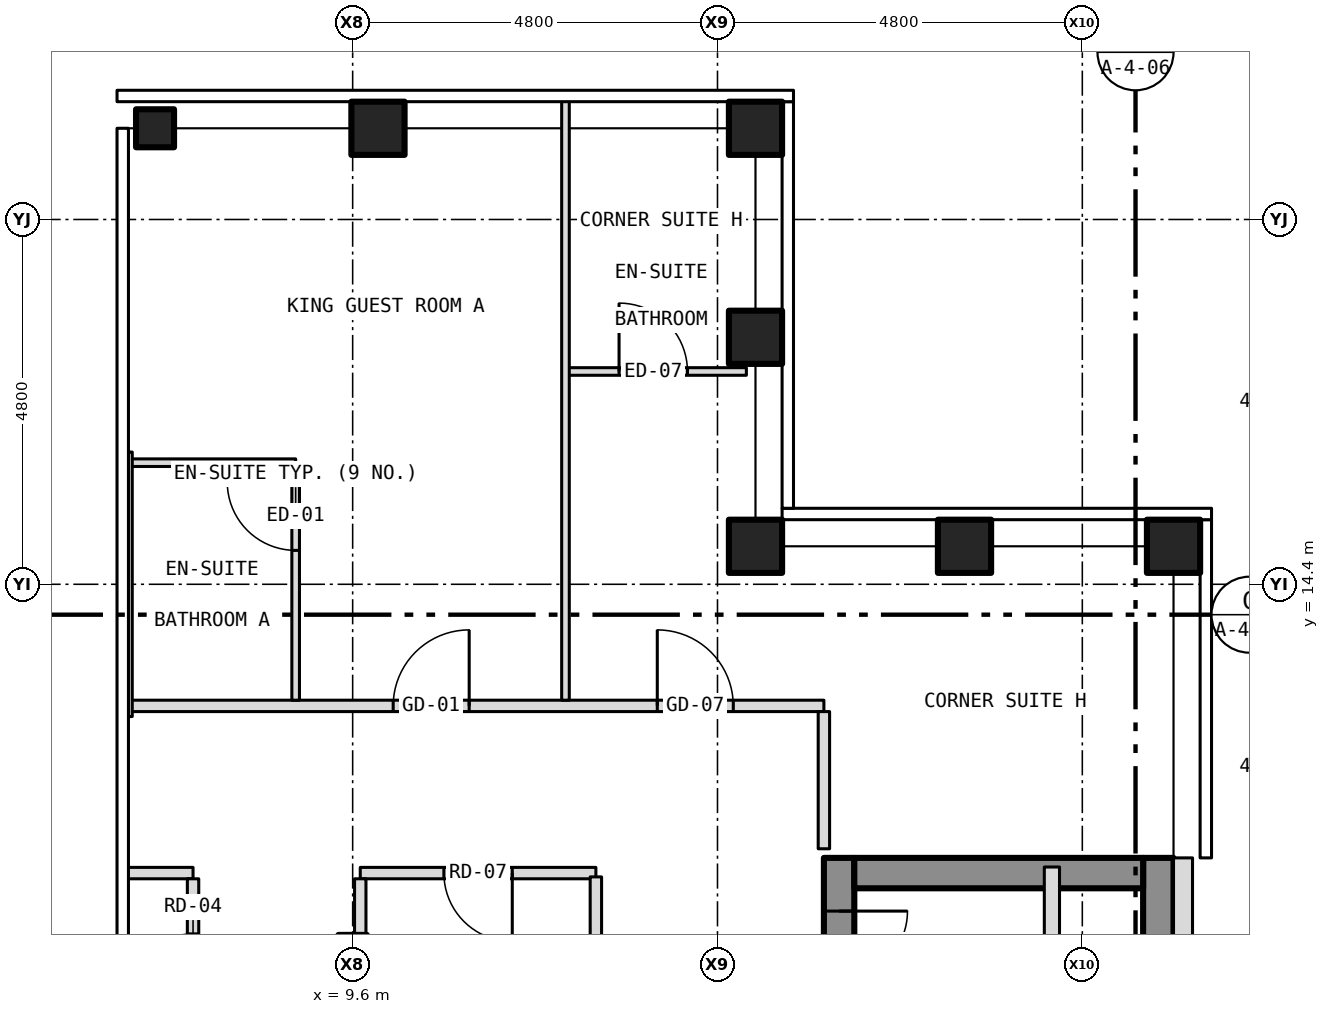
"""IFC4 building model, lengths in metres.
Left out: names, types, materials, properties, quantities, classifications, styles, units other than length and angle.
Written with IfcOpenShell. Run it as: python <this file> out.ifc"""

import sys

from ifc_helpers import new_model, si_unit, direction, frame, frame_2d, origin, origin_2d, place, context, subcontext, project, spatial, rectangle, hollow_rectangle, extrude, element, fill, save


model = new_model("IFC4")
c1 = context("Model", 3, precision=1e-05, world=origin(), true_north=direction((0.0, 1.0)))
c2 = subcontext(c1, "Body", "Model", "MODEL_VIEW")
j1 = project(units=[si_unit("LENGTHUNIT", "METRE"), si_unit("PLANEANGLEUNIT", "RADIAN")], contexts=[c1])
p1 = place(None, origin())
s1 = spatial("IfcSite", under=j1, at=p1, CompositionType="ELEMENT")
p2 = place(p1, origin())
s2 = spatial("IfcBuilding", under=s1, at=p2, CompositionType="ELEMENT")
p3 = place(p2, frame((0.0, 0.0, 233.0)))
s3 = spatial("IfcBuildingStorey", under=s2, at=p3, CompositionType="ELEMENT", Elevation=233.0)
for number, where, z_axis, x_axis in (
    (1, (9.933, 20.4, -0.15), (0.0, 0.0, 1.0), (1.0, 0.0, 0.0)),
    (2, (14.9, 20.4, -0.15), (0.0, 0.0, 1.0), (1.0, 0.0, 0.0)),
    (3, (20.4, 14.9, -0.15), (0.0, 0.0, 1.0), (1.0, 0.0, 0.0)),
    (4, (14.9, 14.9, -0.15), (0.0, 0.0, 1.0), (1.0, 0.0, 0.0)),
    (5, (14.9, 17.65, -0.15), (0.0, 0.0, 1.0), (1.0, 0.0, 0.0)),
    (6, (17.65, 14.9, -0.15), (0.0, 0.0, 1.0), (1.0, 0.0, 0.0)),
):
    element("IfcColumn", number, at=place(p3, frame(where, z_axis=z_axis, x_axis=x_axis)), inside=s3, PredefinedType="COLUMN", context=c2, shape_type="SweptSolid", body=[
        extrude(hollow_rectangle(XDim=0.7, YDim=0.7, WallThickness=0.04, at=origin_2d()), origin(), (0.0, 0.0, 1.0), 3.35),
    ])
p4 = place(p3, frame((7.0, 20.4, -0.15), z_axis=(0.0, 0.0, 1.0), x_axis=(1.0, 0.0, 0.0)))
e7 = element("IfcColumn", 7, at=p4, inside=s3, PredefinedType="COLUMN", context=c2, shape_type="SweptSolid", body=[
    extrude(hollow_rectangle(XDim=0.5, YDim=0.5, WallThickness=0.03, at=origin_2d()), origin(), (0.0, 0.0, 1.0), 3.35),
])
p5 = place(p3, frame((16.0, -10.8, 0.0), z_axis=(0.0, 0.0, 1.0), x_axis=(0.0, 1.0, 0.0)))
e8 = element("IfcWall", 8, at=p5, inside=s3, PredefinedType="SHEAR", context=c2, shape_type="SweptSolid", body=[
    extrude(rectangle(XDim=21.6, YDim=0.4, at=frame_2d((10.8, 0.0))), origin(), (0.0, 0.0, 1.0), 2.9),
])
p6 = place(p5, frame((9.4, 0.0, 0.0)))
e9 = element("IfcOpeningElement", 9, at=p6, cuts=e8, PredefinedType="OPENING", context=c2, shape_type="SweptSolid", body=[
    extrude(rectangle(XDim=1.1, YDim=2.1, at=frame_2d((0.55, 1.05))), frame((0.0, 0.212, 0.0), z_axis=(0.0, -1.0, 0.0), x_axis=(1.0, 0.0, 0.0)), (0.0, 0.0, 1.0), 0.424),
])
p7 = place(p5, frame((11.5, 0.0, 0.0)))
e10 = element("IfcOpeningElement", 10, at=p7, cuts=e8, PredefinedType="OPENING", context=c2, shape_type="SweptSolid", body=[
    extrude(rectangle(XDim=1.1, YDim=2.1, at=frame_2d((0.55, 1.05))), frame((0.0, 0.212, 0.0), z_axis=(0.0, -1.0, 0.0), x_axis=(1.0, 0.0, 0.0)), (0.0, 0.0, 1.0), 0.424),
])
p8 = place(p5, frame((13.6, 0.0, 0.0)))
e11 = element("IfcOpeningElement", 11, at=p8, cuts=e8, PredefinedType="OPENING", context=c2, shape_type="SweptSolid", body=[
    extrude(rectangle(XDim=1.1, YDim=2.1, at=frame_2d((0.55, 1.05))), frame((0.0, 0.212, 0.0), z_axis=(0.0, -1.0, 0.0), x_axis=(1.0, 0.0, 0.0)), (0.0, 0.0, 1.0), 0.424),
])
p9 = place(p5, frame((15.7, 0.0, 0.0)))
e12 = element("IfcOpeningElement", 12, at=p9, cuts=e8, PredefinedType="OPENING", context=c2, shape_type="SweptSolid", body=[
    extrude(rectangle(XDim=1.1, YDim=2.1, at=frame_2d((0.55, 1.05))), frame((0.0, 0.212, 0.0), z_axis=(0.0, -1.0, 0.0), x_axis=(1.0, 0.0, 0.0)), (0.0, 0.0, 1.0), 0.424),
])
p10 = place(p5, frame((17.8, 0.0, 0.0)))
e13 = element("IfcOpeningElement", 13, at=p10, cuts=e8, PredefinedType="OPENING", context=c2, shape_type="SweptSolid", body=[
    extrude(rectangle(XDim=1.1, YDim=2.1, at=frame_2d((0.55, 1.05))), frame((0.0, 0.212, 0.0), z_axis=(0.0, -1.0, 0.0), x_axis=(1.0, 0.0, 0.0)), (0.0, 0.0, 1.0), 0.424),
])
p11 = place(p5, frame((5.642, 0.0, 0.0)))
e14 = element("IfcOpeningElement", 14, at=p11, cuts=e8, PredefinedType="OPENING", context=c2, shape_type="SweptSolid", body=[
    extrude(rectangle(XDim=1.1, YDim=2.1, at=frame_2d((0.55, 1.05))), frame((0.0, 0.212, 0.0), z_axis=(0.0, -1.0, 0.0), x_axis=(1.0, 0.0, 0.0)), (0.0, 0.0, 1.0), 0.424),
])
p12 = place(p5, frame((7.5, 0.0, 0.0)))
e15 = element("IfcOpeningElement", 15, at=p12, cuts=e8, PredefinedType="OPENING", context=c2, shape_type="SweptSolid", body=[
    extrude(rectangle(XDim=1.1, YDim=2.1, at=frame_2d((0.55, 1.05))), frame((0.0, 0.212, 0.0), z_axis=(0.0, -1.0, 0.0), x_axis=(1.0, 0.0, 0.0)), (0.0, 0.0, 1.0), 0.424),
])
p13 = place(p5, frame((20.0, 0.0, 0.0)))
e16 = element("IfcOpeningElement", 16, at=p13, cuts=e8, PredefinedType="OPENING", context=c2, shape_type="SweptSolid", body=[
    extrude(rectangle(XDim=0.9, YDim=2.1, at=frame_2d((0.45, 1.05))), frame((0.0, 0.212, 0.0), z_axis=(0.0, -1.0, 0.0), x_axis=(1.0, 0.0, 0.0)), (0.0, 0.0, 1.0), 0.424),
])
p14 = place(p3, frame((20.2, -10.8, 0.0), z_axis=(0.0, 0.0, 1.0), x_axis=(0.0, 1.0, 0.0)))
e17 = element("IfcWall", 17, at=p14, inside=s3, PredefinedType="SHEAR", context=c2, shape_type="SweptSolid", body=[
    extrude(rectangle(XDim=21.6, YDim=0.4, at=frame_2d((10.8, 0.0))), origin(), (0.0, 0.0, 1.0), 2.9),
])
p15 = place(p3, frame((16.2, 10.6, 0.0), z_axis=(0.0, 0.0, 1.0), x_axis=(1.0, 0.0, 0.0)))
e18 = element("IfcWall", 18, at=p15, inside=s3, PredefinedType="SHEAR", context=c2, shape_type="SweptSolid", body=[
    extrude(rectangle(XDim=3.8, YDim=0.4, at=frame_2d((1.9, 0.0))), origin(), (0.0, 0.0, 1.0), 2.9),
])
p16 = place(p3, frame((20.525, -10.8, 0.0), z_axis=(0.0, 0.0, 1.0), x_axis=(0.0, 1.0, 0.0)))
e19 = element("IfcWall", 19, at=p16, inside=s3, PredefinedType="SOLIDWALL", context=c2, shape_type="SweptSolid", body=[
    extrude(rectangle(XDim=21.6, YDim=0.25, at=frame_2d((10.8, 0.0))), origin(), (0.0, 0.0, 1.0), 3.5),
])
p17 = place(p16, frame((2.95, 0.0, 1.0)))
e20 = element("IfcOpeningElement", 20, at=p17, cuts=e19, PredefinedType="OPENING", context=c2, shape_type="SweptSolid", body=[
    extrude(rectangle(XDim=0.6, YDim=1.5, at=frame_2d((0.3, 0.75))), frame((0.0, 0.137, 0.0), z_axis=(0.0, -1.0, 0.0), x_axis=(1.0, 0.0, 0.0)), (0.0, 0.0, 1.0), 0.274),
])
p18 = place(p3, frame((6.62, 10.6, 0.0), z_axis=(0.0, 0.0, 1.0), x_axis=(1.0, 0.0, 0.0)))
e21 = element("IfcWall", 21, at=p18, inside=s3, PredefinedType="PARTITIONING", context=c2, shape_type="SweptSolid", body=[
    extrude(rectangle(XDim=0.88, YDim=0.15, at=frame_2d((0.44, 0.0))), origin(), (0.0, 0.0, 1.0), 3.2),
])
p19 = place(p3, frame((9.7, 10.6, 0.0), z_axis=(0.0, 0.0, 1.0), x_axis=(1.0, 0.0, 0.0)))
e22 = element("IfcWall", 22, at=p19, inside=s3, PredefinedType="PARTITIONING", context=c2, shape_type="SweptSolid", body=[
    extrude(rectangle(XDim=3.1, YDim=0.15, at=frame_2d((1.55, 0.0))), origin(), (0.0, 0.0, 1.0), 3.2),
])
p20 = place(p19, frame((1.1, 0.0, 0.0)))
e23 = element("IfcOpeningElement", 23, at=p20, cuts=e22, PredefinedType="OPENING", context=c2, shape_type="SweptSolid", body=[
    extrude(rectangle(XDim=0.9, YDim=2.1, at=frame_2d((0.45, 1.05))), frame((0.0, 0.087, 0.0), z_axis=(0.0, -1.0, 0.0), x_axis=(1.0, 0.0, 0.0)), (0.0, 0.0, 1.0), 0.174),
])
p21 = place(p3, frame((6.65, 12.8, 0.0), z_axis=(0.0, 0.0, 1.0), x_axis=(1.0, 0.0, 0.0)))
e24 = element("IfcWall", 24, at=p21, inside=s3, PredefinedType="PARTITIONING", context=c2, shape_type="SweptSolid", body=[
    extrude(rectangle(XDim=9.15, YDim=0.15, at=frame_2d((4.575, 0.0))), origin(), (0.0, 0.0, 1.0), 3.2),
])
p22 = place(p21, frame((3.483, 0.0, 0.0)))
e25 = element("IfcOpeningElement", 25, at=p22, cuts=e24, PredefinedType="OPENING", context=c2, shape_type="SweptSolid", body=[
    extrude(rectangle(XDim=1.0, YDim=2.1, at=frame_2d((0.5, 1.05))), frame((0.0, 0.087, 0.0), z_axis=(0.0, -1.0, 0.0), x_axis=(1.0, 0.0, 0.0)), (0.0, 0.0, 1.0), 0.174),
])
p23 = place(p21, frame((6.958, 0.0, 0.0)))
e26 = element("IfcOpeningElement", 26, at=p23, cuts=e24, PredefinedType="OPENING", context=c2, shape_type="SweptSolid", body=[
    extrude(rectangle(XDim=1.0, YDim=2.1, at=frame_2d((0.5, 1.05))), frame((0.0, 0.087, 0.0), z_axis=(0.0, -1.0, 0.0), x_axis=(1.0, 0.0, 0.0)), (0.0, 0.0, 1.0), 0.174),
])
p24 = place(p3, frame((6.65, 16.0, 0.0), z_axis=(0.0, 0.0, 1.0), x_axis=(1.0, 0.0, 0.0)))
e27 = element("IfcWall", 27, at=p24, inside=s3, PredefinedType="PARTITIONING", context=c2, shape_type="SweptSolid", body=[
    extrude(rectangle(XDim=2.2, YDim=0.1, at=frame_2d((1.1, 0.0))), origin(), (0.0, 0.0, 1.0), 3.2),
])
p25 = place(p3, frame((12.4, 17.2, 0.0), z_axis=(0.0, 0.0, 1.0), x_axis=(1.0, 0.0, 0.0)))
e28 = element("IfcWall", 28, at=p25, inside=s3, PredefinedType="PARTITIONING", context=c2, shape_type="SweptSolid", body=[
    extrude(rectangle(XDim=2.38, YDim=0.1, at=frame_2d((1.19, 0.0))), origin(), (0.0, 0.0, 1.0), 3.2),
])
p26 = place(p25, frame((0.705, 0.0, 0.0)))
e29 = element("IfcOpeningElement", 29, at=p26, cuts=e28, PredefinedType="OPENING", context=c2, shape_type="SweptSolid", body=[
    extrude(rectangle(XDim=0.9, YDim=2.1, at=frame_2d((0.45, 1.05))), frame((0.0, 0.062, 0.0), z_axis=(0.0, -1.0, 0.0), x_axis=(1.0, 0.0, 0.0)), (0.0, 0.0, 1.0), 0.124),
])
p27 = place(p3, frame((6.65, 12.66, 0.0), z_axis=(0.0, 0.0, 1.0), x_axis=(0.0, 1.0, 0.0)))
e30 = element("IfcWall", 30, at=p27, inside=s3, PredefinedType="PARTITIONING", context=c2, shape_type="SweptSolid", body=[
    extrude(rectangle(XDim=3.48, YDim=0.1, at=frame_2d((1.74, 0.0))), origin(), (0.0, 0.0, 1.0), 3.2),
])
p28 = place(p3, frame((7.5, 8.175, 0.0), z_axis=(0.0, 0.0, 1.0), x_axis=(0.0, 1.0, 0.0)))
e31 = element("IfcWall", 31, at=p28, inside=s3, PredefinedType="PARTITIONING", context=c2, shape_type="SweptSolid", body=[
    extrude(rectangle(XDim=2.35, YDim=0.15, at=frame_2d((1.175, 0.0))), origin(), (0.0, 0.0, 1.0), 3.2),
])
p29 = place(p28, frame((0.725, 0.0, 0.0)))
e32 = element("IfcOpeningElement", 32, at=p29, cuts=e31, PredefinedType="OPENING", context=c2, shape_type="SweptSolid", body=[
    extrude(rectangle(XDim=0.9, YDim=2.1, at=frame_2d((0.45, 1.05))), frame((0.0, 0.087, 0.0), z_axis=(0.0, -1.0, 0.0), x_axis=(1.0, 0.0, 0.0)), (0.0, 0.0, 1.0), 0.174),
])
p30 = place(p3, frame((8.85, 12.875, 0.0), z_axis=(0.0, 0.0, 1.0), x_axis=(0.0, 1.0, 0.0)))
e33 = element("IfcWall", 33, at=p30, inside=s3, PredefinedType="PARTITIONING", context=c2, shape_type="SweptSolid", body=[
    extrude(rectangle(XDim=3.075, YDim=0.1, at=frame_2d((1.538, 0.0))), origin(), (0.0, 0.0, 1.0), 3.2),
])
p31 = place(p30, frame((1.971, 0.0, 0.0)))
e34 = element("IfcOpeningElement", 34, at=p31, cuts=e33, PredefinedType="OPENING", context=c2, shape_type="SweptSolid", body=[
    extrude(rectangle(XDim=0.9, YDim=2.1, at=frame_2d((0.45, 1.05))), frame((0.0, 0.062, 0.0), z_axis=(0.0, -1.0, 0.0), x_axis=(1.0, 0.0, 0.0)), (0.0, 0.0, 1.0), 0.124),
])
p32 = place(p3, frame((9.7, 9.399, 0.0), z_axis=(0.0, 0.0, 1.0), x_axis=(0.0, 1.0, 0.0)))
e35 = element("IfcWall", 35, at=p32, inside=s3, PredefinedType="PARTITIONING", context=c2, shape_type="SweptSolid", body=[
    extrude(rectangle(XDim=0.401, YDim=0.15, at=frame_2d((0.201, 0.0))), origin(), (0.0, 0.0, 1.0), 3.2),
])
p33 = place(p3, frame((9.7, 9.8, 0.0), z_axis=(0.0, 0.0, 1.0), x_axis=(0.0, 1.0, 0.0)))
e36 = element("IfcWall", 36, at=p33, inside=s3, PredefinedType="PARTITIONING", context=c2, shape_type="SweptSolid", body=[
    extrude(rectangle(XDim=0.725, YDim=0.15, at=frame_2d((0.362, 0.0))), origin(), (0.0, 0.0, 1.0), 2.578),
])
p34 = place(p3, frame((12.4, 12.875, 0.0), z_axis=(0.0, 0.0, 1.0), x_axis=(0.0, 1.0, 0.0)))
e37 = element("IfcWall", 37, at=p34, inside=s3, PredefinedType="PARTITIONING", context=c2, shape_type="SweptSolid", body=[
    extrude(rectangle(XDim=7.905, YDim=0.1, at=frame_2d((3.953, 0.0))), origin(), (0.0, 0.0, 1.0), 3.2),
])
p35 = place(p3, frame((12.8, 8.175, 0.0), z_axis=(0.0, 0.0, 1.0), x_axis=(0.0, 1.0, 0.0)))
e38 = element("IfcWall", 38, at=p35, inside=s3, PredefinedType="PARTITIONING", context=c2, shape_type="SweptSolid", body=[
    extrude(rectangle(XDim=2.375, YDim=0.15, at=frame_2d((1.188, 0.0))), origin(), (0.0, 0.0, 1.0), 3.2),
])
p36 = place(p3, frame((15.8, 10.92, 0.0), z_axis=(0.0, 0.0, 1.0), x_axis=(0.0, 1.0, 0.0)))
e39 = element("IfcWall", 39, at=p36, inside=s3, PredefinedType="PARTITIONING", context=c2, shape_type="SweptSolid", body=[
    extrude(rectangle(XDim=1.805, YDim=0.15, at=frame_2d((0.903, 0.0))), origin(), (0.0, 0.0, 1.0), 3.2),
])
p37 = place(p3, frame((18.8, -1.8, 0.0), z_axis=(0.0, 0.0, 1.0), x_axis=(0.0, 1.0, 0.0)))
e40 = element("IfcWall", 40, at=p37, inside=s3, PredefinedType="PARTITIONING", context=c2, shape_type="SweptSolid", body=[
    extrude(rectangle(XDim=12.48, YDim=0.2, at=frame_2d((6.24, 0.0))), origin(), (0.0, 0.0, 1.0), 2.9),
])
p38 = place(p13, origin())
e41 = element("IfcDoor", 41, at=p38, inside=s3, OperationType="SINGLE_SWING_RIGHT", PredefinedType="DOOR", context=c2, shape_type="SweptSolid", body=[
    extrude(rectangle(XDim=0.9, YDim=2.1, at=frame_2d((0.45, 1.05))), frame((0.0, 0.025, 0.0), z_axis=(0.0, -1.0, 0.0), x_axis=(1.0, 0.0, 0.0)), (0.0, 0.0, 1.0), 0.05),
])
fill(e16, e41)
p39 = place(p22, origin())
e42 = element("IfcDoor", 42, at=p39, inside=s3, OperationType="SINGLE_SWING_RIGHT", PredefinedType="DOOR", context=c2, shape_type="SweptSolid", body=[
    extrude(rectangle(XDim=1.0, YDim=2.1, at=frame_2d((0.5, 1.05))), frame((0.0, 0.025, 0.0), z_axis=(0.0, -1.0, 0.0), x_axis=(1.0, 0.0, 0.0)), (0.0, 0.0, 1.0), 0.05),
])
fill(e25, e42)
p40 = place(p31, origin())
e43 = element("IfcDoor", 43, at=p40, inside=s3, OperationType="SINGLE_SWING_RIGHT", PredefinedType="DOOR", context=c2, shape_type="SweptSolid", body=[
    extrude(rectangle(XDim=0.9, YDim=2.1, at=frame_2d((0.45, 1.05))), frame((0.0, 0.025, 0.0), z_axis=(0.0, -1.0, 0.0), x_axis=(1.0, 0.0, 0.0)), (0.0, 0.0, 1.0), 0.05),
])
fill(e34, e43)
p41 = place(p26, origin())
e44 = element("IfcDoor", 44, at=p41, inside=s3, OperationType="SINGLE_SWING_LEFT", PredefinedType="DOOR", context=c2, shape_type="SweptSolid", body=[
    extrude(rectangle(XDim=0.9, YDim=2.1, at=frame_2d((0.45, 1.05))), frame((0.0, 0.025, 0.0), z_axis=(0.0, -1.0, 0.0), x_axis=(1.0, 0.0, 0.0)), (0.0, 0.0, 1.0), 0.05),
])
fill(e29, e44)
p42 = place(p23, origin())
e45 = element("IfcDoor", 45, at=p42, inside=s3, OperationType="SINGLE_SWING_LEFT", PredefinedType="DOOR", context=c2, shape_type="SweptSolid", body=[
    extrude(rectangle(XDim=1.0, YDim=2.1, at=frame_2d((0.5, 1.05))), frame((0.0, 0.025, 0.0), z_axis=(0.0, -1.0, 0.0), x_axis=(1.0, 0.0, 0.0)), (0.0, 0.0, 1.0), 0.05),
])
fill(e26, e45)
p43 = place(p20, origin())
e46 = element("IfcDoor", 46, at=p43, inside=s3, OperationType="SINGLE_SWING_RIGHT", PredefinedType="DOOR", context=c2, shape_type="SweptSolid", body=[
    extrude(rectangle(XDim=0.9, YDim=2.1, at=frame_2d((0.45, 1.05))), frame((0.0, 0.025, 0.0), z_axis=(0.0, -1.0, 0.0), x_axis=(1.0, 0.0, 0.0)), (0.0, 0.0, 1.0), 0.05),
])
fill(e23, e46)
save(model, sys.argv[1])
